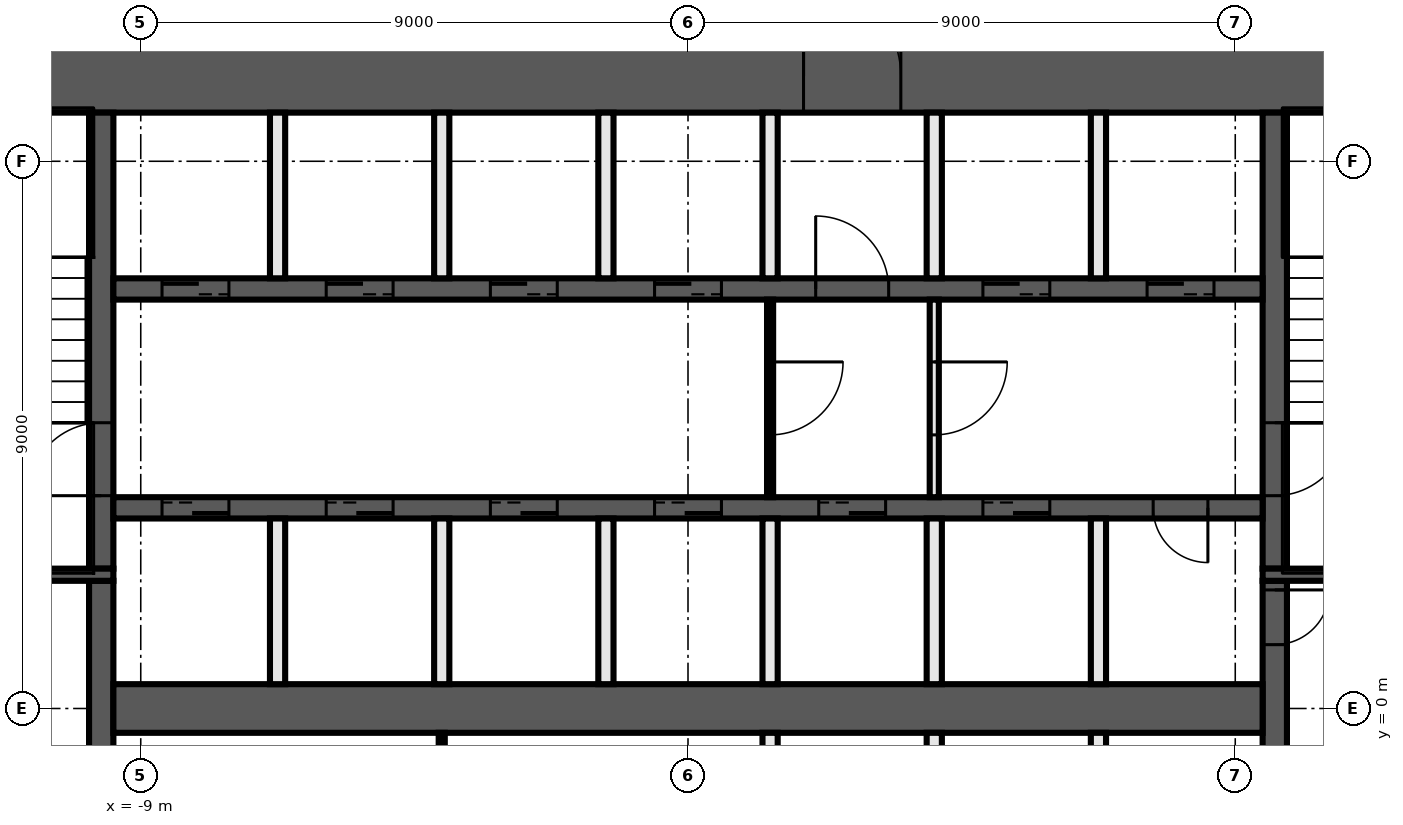
"""IFC4 building model, lengths in metres.
Left out: names, types, materials, properties, quantities, classifications, styles, units other than length and angle.
Written with IfcOpenShell. Run it as: python <this file> out.ifc"""

import sys

from ifc_helpers import new_model, si_unit, direction, frame, frame_2d, origin, place, context, subcontext, project, spatial, rectangle, extrude, element, fill, save


model = new_model("IFC4")
c1 = context("Model", 3, precision=1e-05, world=origin(), true_north=direction((0.0, 1.0)))
c2 = subcontext(c1, "Body", "Model", "MODEL_VIEW")
j1 = project(units=[si_unit("LENGTHUNIT", "METRE"), si_unit("PLANEANGLEUNIT", "RADIAN")], contexts=[c1])
p1 = place(None, origin())
s1 = spatial("IfcSite", under=j1, at=p1, CompositionType="ELEMENT")
p2 = place(p1, origin())
s2 = spatial("IfcBuilding", under=s1, at=p2, CompositionType="ELEMENT")
p3 = place(p2, frame((0.0, 0.0, -6.0)))
s3 = spatial("IfcBuildingStorey", under=s2, at=p3, CompositionType="ELEMENT", Elevation=-6.0)
p4 = place(p3, frame((-14.0, 10.4, 0.0), z_axis=(0.0, 0.0, 1.0), x_axis=(1.0, 0.0, 0.0)))
e1 = element("IfcWall", 1, at=p4, inside=s3, PredefinedType="SHEAR", context=c2, shape_type="SweptSolid", body=[
    extrude(rectangle(XDim=28.0, YDim=1.2, at=frame_2d((14.0, 0.0))), origin(), (0.0, 0.0, 1.0), 5.55),
])
p5 = place(p4, frame((15.9, 0.0, 0.0)))
e2 = element("IfcOpeningElement", 2, at=p5, cuts=e1, PredefinedType="OPENING", context=c2, shape_type="SweptSolid", body=[
    extrude(rectangle(XDim=1.6, YDim=2.1, at=frame_2d((0.8, 1.05))), frame((0.0, 0.61, 0.0), z_axis=(0.0, -1.0, 0.0), x_axis=(1.0, 0.0, 0.0)), (0.0, 0.0, 1.0), 1.22),
])
p6 = place(p3, frame((9.65, 2.1, 0.0), z_axis=(0.0, 0.0, 1.0), x_axis=(0.0, -1.0, 0.0)))
e3 = element("IfcWall", 3, at=p6, inside=s3, PredefinedType="SHEAR", context=c2, shape_type="SweptSolid", body=[
    extrude(rectangle(XDim=4.2, YDim=0.4, at=frame_2d((2.1, 0.0))), origin(), (0.0, 0.0, 1.0), 5.55),
])
p7 = place(p6, frame((0.15, 0.0, 0.0)))
e4 = element("IfcOpeningElement", 4, at=p7, cuts=e3, PredefinedType="OPENING", context=c2, shape_type="SweptSolid", body=[
    extrude(rectangle(XDim=0.9, YDim=2.1, at=frame_2d((0.45, 1.05))), frame((0.0, 0.21, 0.0), z_axis=(0.0, -1.0, 0.0), x_axis=(1.0, 0.0, 0.0)), (0.0, 0.0, 1.0), 0.42),
])
p8 = place(p3, frame((9.65, 9.8, 0.0), z_axis=(0.0, 0.0, 1.0), x_axis=(0.0, -1.0, 0.0)))
e5 = element("IfcWall", 5, at=p8, inside=s3, PredefinedType="SHEAR", context=c2, shape_type="SweptSolid", body=[
    extrude(rectangle(XDim=7.5, YDim=0.4, at=frame_2d((3.75, 0.0))), origin(), (0.0, 0.0, 1.0), 5.55),
])
p9 = place(p8, frame((5.1, 0.0, 0.0)))
e6 = element("IfcOpeningElement", 6, at=p9, cuts=e5, PredefinedType="OPENING", context=c2, shape_type="SweptSolid", body=[
    extrude(rectangle(XDim=1.2, YDim=2.1, at=frame_2d((0.6, 1.05))), frame((0.0, 0.21, 0.0), z_axis=(0.0, -1.0, 0.0), x_axis=(1.0, 0.0, 0.0)), (0.0, 0.0, 1.0), 0.42),
])
p10 = place(p3, frame((-9.65, -2.1, 0.0), z_axis=(0.0, 0.0, 1.0), x_axis=(0.0, 1.0, 0.0)))
e7 = element("IfcWall", 7, at=p10, inside=s3, PredefinedType="SHEAR", context=c2, shape_type="SweptSolid", body=[
    extrude(rectangle(XDim=4.2, YDim=0.4, at=frame_2d((2.1, 0.0))), origin(), (0.0, 0.0, 1.0), 5.55),
])
p11 = place(p3, frame((-9.65, 2.3, 0.0), z_axis=(0.0, 0.0, 1.0), x_axis=(0.0, 1.0, 0.0)))
e8 = element("IfcWall", 8, at=p11, inside=s3, PredefinedType="SHEAR", context=c2, shape_type="SweptSolid", body=[
    extrude(rectangle(XDim=7.5, YDim=0.4, at=frame_2d((3.75, 0.0))), origin(), (0.0, 0.0, 1.0), 5.55),
])
p12 = place(p11, frame((1.2, 0.0, 0.0)))
e9 = element("IfcOpeningElement", 9, at=p12, cuts=e8, PredefinedType="OPENING", context=c2, shape_type="SweptSolid", body=[
    extrude(rectangle(XDim=1.2, YDim=2.1, at=frame_2d((0.6, 1.05))), frame((0.0, 0.21, 0.0), z_axis=(0.0, -1.0, 0.0), x_axis=(1.0, 0.0, 0.0)), (0.0, 0.0, 1.0), 0.42),
])
for number, where, z_axis, x_axis in (
    (10, (9.45, 2.2, 0.0), (0.0, 0.0, 1.0), (1.0, 0.0, 0.0)),
    (11, (-9.45, 2.2, 0.0), (0.0, 0.0, 1.0), (-1.0, 0.0, 0.0)),
):
    element("IfcWall", number, at=place(p3, frame(where, z_axis=z_axis, x_axis=x_axis)), inside=s3, PredefinedType="SHEAR", context=c2, shape_type="SweptSolid", body=[
        extrude(rectangle(XDim=3.35, YDim=0.2, at=frame_2d((1.675, 0.0))), origin(), (0.0, 0.0, 1.0), 5.55),
    ])
p13 = place(p3, frame((-9.45, 6.9, 0.0), z_axis=(0.0, 0.0, 1.0), x_axis=(1.0, 0.0, 0.0)))
e12 = element("IfcWall", 12, at=p13, inside=s3, PredefinedType="SHEAR", context=c2, shape_type="SweptSolid", body=[
    extrude(rectangle(XDim=18.9, YDim=0.35, at=frame_2d((9.45, 0.0))), origin(), (0.0, 0.0, 1.0), 5.55),
])
p14 = place(p13, frame((0.8, 0.0, 0.0)))
e13 = element("IfcOpeningElement", 13, at=p14, cuts=e12, PredefinedType="OPENING", context=c2, shape_type="SweptSolid", body=[
    extrude(rectangle(XDim=1.1, YDim=2.1, at=frame_2d((0.55, 1.05))), frame((0.0, 0.185, 0.0), z_axis=(0.0, -1.0, 0.0), x_axis=(1.0, 0.0, 0.0)), (0.0, 0.0, 1.0), 0.37),
])
p15 = place(p13, frame((3.5, 0.0, 0.0)))
e14 = element("IfcOpeningElement", 14, at=p15, cuts=e12, PredefinedType="OPENING", context=c2, shape_type="SweptSolid", body=[
    extrude(rectangle(XDim=1.1, YDim=2.1, at=frame_2d((0.55, 1.05))), frame((0.0, 0.185, 0.0), z_axis=(0.0, -1.0, 0.0), x_axis=(1.0, 0.0, 0.0)), (0.0, 0.0, 1.0), 0.37),
])
p16 = place(p13, frame((6.2, 0.0, 0.0)))
e15 = element("IfcOpeningElement", 15, at=p16, cuts=e12, PredefinedType="OPENING", context=c2, shape_type="SweptSolid", body=[
    extrude(rectangle(XDim=1.1, YDim=2.1, at=frame_2d((0.55, 1.05))), frame((0.0, 0.185, 0.0), z_axis=(0.0, -1.0, 0.0), x_axis=(1.0, 0.0, 0.0)), (0.0, 0.0, 1.0), 0.37),
])
p17 = place(p13, frame((8.9, 0.0, 0.0)))
e16 = element("IfcOpeningElement", 16, at=p17, cuts=e12, PredefinedType="OPENING", context=c2, shape_type="SweptSolid", body=[
    extrude(rectangle(XDim=1.1, YDim=2.1, at=frame_2d((0.55, 1.05))), frame((0.0, 0.185, 0.0), z_axis=(0.0, -1.0, 0.0), x_axis=(1.0, 0.0, 0.0)), (0.0, 0.0, 1.0), 0.37),
])
p18 = place(p13, frame((11.55, 0.0, 0.0)))
e17 = element("IfcOpeningElement", 17, at=p18, cuts=e12, PredefinedType="OPENING", context=c2, shape_type="SweptSolid", body=[
    extrude(rectangle(XDim=1.2, YDim=2.1, at=frame_2d((0.6, 1.05))), frame((0.0, 0.185, 0.0), z_axis=(0.0, -1.0, 0.0), x_axis=(1.0, 0.0, 0.0)), (0.0, 0.0, 1.0), 0.37),
])
p19 = place(p13, frame((14.3, 0.0, 0.0)))
e18 = element("IfcOpeningElement", 18, at=p19, cuts=e12, PredefinedType="OPENING", context=c2, shape_type="SweptSolid", body=[
    extrude(rectangle(XDim=1.1, YDim=2.1, at=frame_2d((0.55, 1.05))), frame((0.0, 0.185, 0.0), z_axis=(0.0, -1.0, 0.0), x_axis=(1.0, 0.0, 0.0)), (0.0, 0.0, 1.0), 0.37),
])
p20 = place(p13, frame((17.0, 0.0, 0.0)))
e19 = element("IfcOpeningElement", 19, at=p20, cuts=e12, PredefinedType="OPENING", context=c2, shape_type="SweptSolid", body=[
    extrude(rectangle(XDim=1.1, YDim=2.1, at=frame_2d((0.55, 1.05))), frame((0.0, 0.185, 0.0), z_axis=(0.0, -1.0, 0.0), x_axis=(1.0, 0.0, 0.0)), (0.0, 0.0, 1.0), 0.37),
])
p21 = place(p3, frame((9.45, 3.3, 0.0), z_axis=(0.0, 0.0, 1.0), x_axis=(-1.0, 0.0, 0.0)))
e20 = element("IfcWall", 20, at=p21, inside=s3, PredefinedType="SHEAR", context=c2, shape_type="SweptSolid", body=[
    extrude(rectangle(XDim=18.9, YDim=0.35, at=frame_2d((9.45, 0.0))), origin(), (0.0, 0.0, 1.0), 5.55),
])
p22 = place(p21, frame((17.0, 0.0, 0.0)))
e21 = element("IfcOpeningElement", 21, at=p22, cuts=e20, PredefinedType="OPENING", context=c2, shape_type="SweptSolid", body=[
    extrude(rectangle(XDim=1.1, YDim=2.1, at=frame_2d((0.55, 1.05))), frame((0.0, 0.185, 0.0), z_axis=(0.0, -1.0, 0.0), x_axis=(1.0, 0.0, 0.0)), (0.0, 0.0, 1.0), 0.37),
])
p23 = place(p21, frame((14.3, 0.0, 0.0)))
e22 = element("IfcOpeningElement", 22, at=p23, cuts=e20, PredefinedType="OPENING", context=c2, shape_type="SweptSolid", body=[
    extrude(rectangle(XDim=1.1, YDim=2.1, at=frame_2d((0.55, 1.05))), frame((0.0, 0.185, 0.0), z_axis=(0.0, -1.0, 0.0), x_axis=(1.0, 0.0, 0.0)), (0.0, 0.0, 1.0), 0.37),
])
p24 = place(p21, frame((11.6, 0.0, 0.0)))
e23 = element("IfcOpeningElement", 23, at=p24, cuts=e20, PredefinedType="OPENING", context=c2, shape_type="SweptSolid", body=[
    extrude(rectangle(XDim=1.1, YDim=2.1, at=frame_2d((0.55, 1.05))), frame((0.0, 0.185, 0.0), z_axis=(0.0, -1.0, 0.0), x_axis=(1.0, 0.0, 0.0)), (0.0, 0.0, 1.0), 0.37),
])
p25 = place(p21, frame((8.9, 0.0, 0.0)))
e24 = element("IfcOpeningElement", 24, at=p25, cuts=e20, PredefinedType="OPENING", context=c2, shape_type="SweptSolid", body=[
    extrude(rectangle(XDim=1.1, YDim=2.1, at=frame_2d((0.55, 1.05))), frame((0.0, 0.185, 0.0), z_axis=(0.0, -1.0, 0.0), x_axis=(1.0, 0.0, 0.0)), (0.0, 0.0, 1.0), 0.37),
])
p26 = place(p21, frame((6.2, 0.0, 0.0)))
e25 = element("IfcOpeningElement", 25, at=p26, cuts=e20, PredefinedType="OPENING", context=c2, shape_type="SweptSolid", body=[
    extrude(rectangle(XDim=1.1, YDim=2.1, at=frame_2d((0.55, 1.05))), frame((0.0, 0.185, 0.0), z_axis=(0.0, -1.0, 0.0), x_axis=(1.0, 0.0, 0.0)), (0.0, 0.0, 1.0), 0.37),
])
p27 = place(p21, frame((3.5, 0.0, 0.0)))
e26 = element("IfcOpeningElement", 26, at=p27, cuts=e20, PredefinedType="OPENING", context=c2, shape_type="SweptSolid", body=[
    extrude(rectangle(XDim=1.1, YDim=2.1, at=frame_2d((0.55, 1.05))), frame((0.0, 0.185, 0.0), z_axis=(0.0, -1.0, 0.0), x_axis=(1.0, 0.0, 0.0)), (0.0, 0.0, 1.0), 0.37),
])
p28 = place(p21, frame((0.9, 0.0, 0.0)))
e27 = element("IfcOpeningElement", 27, at=p28, cuts=e20, PredefinedType="OPENING", context=c2, shape_type="SweptSolid", body=[
    extrude(rectangle(XDim=0.9, YDim=2.1, at=frame_2d((0.45, 1.05))), frame((0.0, 0.185, 0.0), z_axis=(0.0, -1.0, 0.0), x_axis=(1.0, 0.0, 0.0)), (0.0, 0.0, 1.0), 0.37),
])
p29 = place(p3, frame((-9.45, 0.0, 0.0), z_axis=(0.0, 0.0, 1.0), x_axis=(1.0, 0.0, 0.0)))
e28 = element("IfcWall", 28, at=p29, inside=s3, PredefinedType="SHEAR", context=c2, shape_type="SweptSolid", body=[
    extrude(rectangle(XDim=18.9, YDim=0.8, at=frame_2d((9.45, 0.0))), origin(), (0.0, 0.0, 1.0), 5.55),
])
for number, where, z_axis, x_axis in (
    (29, (6.75, -3.125, 0.0), (0.0, 0.0, 1.0), (0.0, 1.0, 0.0)),
    (30, (6.75, 0.4, 0.0), (0.0, 0.0, 1.0), (0.0, 1.0, 0.0)),
    (31, (6.75, 7.075, 0.0), (0.0, 0.0, 1.0), (0.0, 1.0, 0.0)),
):
    element("IfcWall", number, at=place(p3, frame(where, z_axis=z_axis, x_axis=x_axis)), inside=s3, PredefinedType="SOLIDWALL", context=c2, shape_type="SweptSolid", body=[
        extrude(rectangle(XDim=2.725, YDim=0.25, at=frame_2d((1.363, 0.0))), origin(), (0.0, 0.0, 1.0), 5.55),
    ])
p30 = place(p3, frame((4.05, 6.725, 0.0), z_axis=(0.0, 0.0, 1.0), x_axis=(0.0, -1.0, 0.0)))
e32 = element("IfcWall", 32, at=p30, inside=s3, PredefinedType="PARTITIONING", context=c2, shape_type="SweptSolid", body=[
    extrude(rectangle(XDim=3.25, YDim=0.15, at=frame_2d((1.625, 0.0))), origin(), (0.0, 0.0, 1.0), 5.55),
])
p31 = place(p30, frame((1.025, 0.0, 0.0)))
e33 = element("IfcOpeningElement", 33, at=p31, cuts=e32, PredefinedType="OPENING", context=c2, shape_type="SweptSolid", body=[
    extrude(rectangle(XDim=1.2, YDim=2.1, at=frame_2d((0.6, 1.05))), frame((0.0, 0.085, 0.0), z_axis=(0.0, -1.0, 0.0), x_axis=(1.0, 0.0, 0.0)), (0.0, 0.0, 1.0), 0.17),
])
for number, where, z_axis, x_axis in (
    (34, (4.05, -3.125, 0.0), (0.0, 0.0, 1.0), (0.0, 1.0, 0.0)),
    (35, (4.05, 0.4, 0.0), (0.0, 0.0, 1.0), (0.0, 1.0, 0.0)),
    (36, (4.05, 7.075, 0.0), (0.0, 0.0, 1.0), (0.0, 1.0, 0.0)),
):
    element("IfcWall", number, at=place(p3, frame(where, z_axis=z_axis, x_axis=x_axis)), inside=s3, PredefinedType="SOLIDWALL", context=c2, shape_type="SweptSolid", body=[
        extrude(rectangle(XDim=2.725, YDim=0.25, at=frame_2d((1.363, 0.0))), origin(), (0.0, 0.0, 1.0), 5.55),
    ])
p32 = place(p3, frame((1.35, 6.725, 0.0), z_axis=(0.0, 0.0, 1.0), x_axis=(0.0, -1.0, 0.0)))
e37 = element("IfcWall", 37, at=p32, inside=s3, PredefinedType="PARTITIONING", context=c2, shape_type="SweptSolid", body=[
    extrude(rectangle(XDim=3.25, YDim=0.1, at=frame_2d((1.625, 0.0))), origin(), (0.0, 0.0, 1.0), 5.55),
])
p33 = place(p32, frame((1.025, 0.0, 0.0)))
e38 = element("IfcOpeningElement", 38, at=p33, cuts=e37, PredefinedType="OPENING", context=c2, shape_type="SweptSolid", body=[
    extrude(rectangle(XDim=1.2, YDim=2.1, at=frame_2d((0.6, 1.05))), frame((0.0, 0.06, 0.0), z_axis=(0.0, -1.0, 0.0), x_axis=(1.0, 0.0, 0.0)), (0.0, 0.0, 1.0), 0.12),
])
for number, where, z_axis, x_axis in (
    (39, (1.35, -3.125, 0.0), (0.0, 0.0, 1.0), (0.0, 1.0, 0.0)),
    (40, (1.35, 0.4, 0.0), (0.0, 0.0, 1.0), (0.0, 1.0, 0.0)),
    (41, (1.35, 7.075, 0.0), (0.0, 0.0, 1.0), (0.0, 1.0, 0.0)),
    (42, (-1.35, 0.4, 0.0), (0.0, 0.0, 1.0), (0.0, 1.0, 0.0)),
    (43, (-1.35, 7.075, 0.0), (0.0, 0.0, 1.0), (0.0, 1.0, 0.0)),
):
    element("IfcWall", number, at=place(p3, frame(where, z_axis=z_axis, x_axis=x_axis)), inside=s3, PredefinedType="SOLIDWALL", context=c2, shape_type="SweptSolid", body=[
        extrude(rectangle(XDim=2.725, YDim=0.25, at=frame_2d((1.363, 0.0))), origin(), (0.0, 0.0, 1.0), 5.55),
    ])
p34 = place(p3, frame((-4.05, -3.125, 0.0), z_axis=(0.0, 0.0, 1.0), x_axis=(0.0, 1.0, 0.0)))
e44 = element("IfcWall", 44, at=p34, inside=s3, PredefinedType="PARTITIONING", context=c2, shape_type="SweptSolid", body=[
    extrude(rectangle(XDim=2.725, YDim=0.1, at=frame_2d((1.363, 0.0))), origin(), (0.0, 0.0, 1.0), 5.55),
])
for number, where, z_axis, x_axis in (
    (45, (-4.05, 0.4, 0.0), (0.0, 0.0, 1.0), (0.0, 1.0, 0.0)),
    (46, (-4.05, 7.075, 0.0), (0.0, 0.0, 1.0), (0.0, 1.0, 0.0)),
    (47, (-6.75, 0.4, 0.0), (0.0, 0.0, 1.0), (0.0, 1.0, 0.0)),
    (48, (-6.75, 7.075, 0.0), (0.0, 0.0, 1.0), (0.0, 1.0, 0.0)),
):
    element("IfcWall", number, at=place(p3, frame(where, z_axis=z_axis, x_axis=x_axis)), inside=s3, PredefinedType="SOLIDWALL", context=c2, shape_type="SweptSolid", body=[
        extrude(rectangle(XDim=2.725, YDim=0.25, at=frame_2d((1.363, 0.0))), origin(), (0.0, 0.0, 1.0), 5.55),
    ])
p35 = place(p7, origin())
e49 = element("IfcDoor", 49, at=p35, inside=s3, OperationType="SINGLE_SWING_RIGHT", PredefinedType="DOOR", context=c2, shape_type="SweptSolid", body=[
    extrude(rectangle(XDim=0.9, YDim=2.1, at=frame_2d((0.45, 1.05))), frame((0.0, 0.025, 0.0), z_axis=(0.0, -1.0, 0.0), x_axis=(1.0, 0.0, 0.0)), (0.0, 0.0, 1.0), 0.05),
])
fill(e4, e49)
p36 = place(p14, origin())
e50 = element("IfcDoor", 50, at=p36, inside=s3, OperationType="DOUBLE_DOOR_SLIDING", PredefinedType="DOOR", context=c2, shape_type="SweptSolid", body=[
    extrude(rectangle(XDim=1.1, YDim=2.1, at=frame_2d((0.55, 1.05))), frame((0.0, 0.025, 0.0), z_axis=(0.0, -1.0, 0.0), x_axis=(1.0, 0.0, 0.0)), (0.0, 0.0, 1.0), 0.05),
])
fill(e13, e50)
p37 = place(p15, origin())
e51 = element("IfcDoor", 51, at=p37, inside=s3, OperationType="DOUBLE_DOOR_SLIDING", PredefinedType="DOOR", context=c2, shape_type="SweptSolid", body=[
    extrude(rectangle(XDim=1.1, YDim=2.1, at=frame_2d((0.55, 1.05))), frame((0.0, 0.025, 0.0), z_axis=(0.0, -1.0, 0.0), x_axis=(1.0, 0.0, 0.0)), (0.0, 0.0, 1.0), 0.05),
])
fill(e14, e51)
p38 = place(p16, origin())
e52 = element("IfcDoor", 52, at=p38, inside=s3, OperationType="DOUBLE_DOOR_SLIDING", PredefinedType="DOOR", context=c2, shape_type="SweptSolid", body=[
    extrude(rectangle(XDim=1.1, YDim=2.1, at=frame_2d((0.55, 1.05))), frame((0.0, 0.025, 0.0), z_axis=(0.0, -1.0, 0.0), x_axis=(1.0, 0.0, 0.0)), (0.0, 0.0, 1.0), 0.05),
])
fill(e15, e52)
p39 = place(p17, origin())
e53 = element("IfcDoor", 53, at=p39, inside=s3, OperationType="DOUBLE_DOOR_SLIDING", PredefinedType="DOOR", context=c2, shape_type="SweptSolid", body=[
    extrude(rectangle(XDim=1.1, YDim=2.1, at=frame_2d((0.55, 1.05))), frame((0.0, 0.025, 0.0), z_axis=(0.0, -1.0, 0.0), x_axis=(1.0, 0.0, 0.0)), (0.0, 0.0, 1.0), 0.05),
])
fill(e16, e53)
p40 = place(p5, origin())
e54 = element("IfcDoor", 54, at=p40, inside=s3, OperationType="DOUBLE_DOOR_SINGLE_SWING", PredefinedType="DOOR", context=c2, shape_type="SweptSolid", body=[
    extrude(rectangle(XDim=1.6, YDim=2.1, at=frame_2d((0.8, 1.05))), frame((0.0, 0.025, 0.0), z_axis=(0.0, -1.0, 0.0), x_axis=(1.0, 0.0, 0.0)), (0.0, 0.0, 1.0), 0.05),
])
fill(e2, e54)
p41 = place(p18, origin())
e55 = element("IfcDoor", 55, at=p41, inside=s3, OperationType="SINGLE_SWING_LEFT", PredefinedType="DOOR", context=c2, shape_type="SweptSolid", body=[
    extrude(rectangle(XDim=1.2, YDim=2.1, at=frame_2d((0.6, 1.05))), frame((0.0, 0.025, 0.0), z_axis=(0.0, -1.0, 0.0), x_axis=(1.0, 0.0, 0.0)), (0.0, 0.0, 1.0), 0.05),
])
fill(e17, e55)
p42 = place(p19, origin())
e56 = element("IfcDoor", 56, at=p42, inside=s3, OperationType="DOUBLE_DOOR_SLIDING", PredefinedType="DOOR", context=c2, shape_type="SweptSolid", body=[
    extrude(rectangle(XDim=1.1, YDim=2.1, at=frame_2d((0.55, 1.05))), frame((0.0, 0.025, 0.0), z_axis=(0.0, -1.0, 0.0), x_axis=(1.0, 0.0, 0.0)), (0.0, 0.0, 1.0), 0.05),
])
fill(e18, e56)
p43 = place(p20, origin())
e57 = element("IfcDoor", 57, at=p43, inside=s3, OperationType="DOUBLE_DOOR_SLIDING", PredefinedType="DOOR", context=c2, shape_type="SweptSolid", body=[
    extrude(rectangle(XDim=1.1, YDim=2.1, at=frame_2d((0.55, 1.05))), frame((0.0, 0.025, 0.0), z_axis=(0.0, -1.0, 0.0), x_axis=(1.0, 0.0, 0.0)), (0.0, 0.0, 1.0), 0.05),
])
fill(e19, e57)
p44 = place(p22, origin())
e58 = element("IfcDoor", 58, at=p44, inside=s3, OperationType="DOUBLE_DOOR_SLIDING", PredefinedType="DOOR", context=c2, shape_type="SweptSolid", body=[
    extrude(rectangle(XDim=1.1, YDim=2.1, at=frame_2d((0.55, 1.05))), frame((0.0, 0.025, 0.0), z_axis=(0.0, -1.0, 0.0), x_axis=(1.0, 0.0, 0.0)), (0.0, 0.0, 1.0), 0.05),
])
fill(e21, e58)
p45 = place(p23, origin())
e59 = element("IfcDoor", 59, at=p45, inside=s3, OperationType="DOUBLE_DOOR_SLIDING", PredefinedType="DOOR", context=c2, shape_type="SweptSolid", body=[
    extrude(rectangle(XDim=1.1, YDim=2.1, at=frame_2d((0.55, 1.05))), frame((0.0, 0.025, 0.0), z_axis=(0.0, -1.0, 0.0), x_axis=(1.0, 0.0, 0.0)), (0.0, 0.0, 1.0), 0.05),
])
fill(e22, e59)
p46 = place(p24, origin())
e60 = element("IfcDoor", 60, at=p46, inside=s3, OperationType="DOUBLE_DOOR_SLIDING", PredefinedType="DOOR", context=c2, shape_type="SweptSolid", body=[
    extrude(rectangle(XDim=1.1, YDim=2.1, at=frame_2d((0.55, 1.05))), frame((0.0, 0.025, 0.0), z_axis=(0.0, -1.0, 0.0), x_axis=(1.0, 0.0, 0.0)), (0.0, 0.0, 1.0), 0.05),
])
fill(e23, e60)
p47 = place(p25, origin())
e61 = element("IfcDoor", 61, at=p47, inside=s3, OperationType="DOUBLE_DOOR_SLIDING", PredefinedType="DOOR", context=c2, shape_type="SweptSolid", body=[
    extrude(rectangle(XDim=1.1, YDim=2.1, at=frame_2d((0.55, 1.05))), frame((0.0, 0.025, 0.0), z_axis=(0.0, -1.0, 0.0), x_axis=(1.0, 0.0, 0.0)), (0.0, 0.0, 1.0), 0.05),
])
fill(e24, e61)
p48 = place(p26, origin())
e62 = element("IfcDoor", 62, at=p48, inside=s3, OperationType="DOUBLE_DOOR_SLIDING", PredefinedType="DOOR", context=c2, shape_type="SweptSolid", body=[
    extrude(rectangle(XDim=1.1, YDim=2.1, at=frame_2d((0.55, 1.05))), frame((0.0, 0.025, 0.0), z_axis=(0.0, -1.0, 0.0), x_axis=(1.0, 0.0, 0.0)), (0.0, 0.0, 1.0), 0.05),
])
fill(e25, e62)
p49 = place(p27, origin())
e63 = element("IfcDoor", 63, at=p49, inside=s3, OperationType="DOUBLE_DOOR_SLIDING", PredefinedType="DOOR", context=c2, shape_type="SweptSolid", body=[
    extrude(rectangle(XDim=1.1, YDim=2.1, at=frame_2d((0.55, 1.05))), frame((0.0, 0.025, 0.0), z_axis=(0.0, -1.0, 0.0), x_axis=(1.0, 0.0, 0.0)), (0.0, 0.0, 1.0), 0.05),
])
fill(e26, e63)
p50 = place(p28, origin())
e64 = element("IfcDoor", 64, at=p50, inside=s3, OperationType="SINGLE_SWING_LEFT", PredefinedType="DOOR", context=c2, shape_type="SweptSolid", body=[
    extrude(rectangle(XDim=0.9, YDim=2.1, at=frame_2d((0.45, 1.05))), frame((0.0, 0.025, 0.0), z_axis=(0.0, -1.0, 0.0), x_axis=(1.0, 0.0, 0.0)), (0.0, 0.0, 1.0), 0.05),
])
fill(e27, e64)
p51 = place(p9, origin())
e65 = element("IfcDoor", 65, at=p51, inside=s3, OperationType="SINGLE_SWING_LEFT", PredefinedType="DOOR", context=c2, shape_type="SweptSolid", body=[
    extrude(rectangle(XDim=1.2, YDim=2.1, at=frame_2d((0.6, 1.05))), frame((0.0, 0.025, 0.0), z_axis=(0.0, -1.0, 0.0), x_axis=(1.0, 0.0, 0.0)), (0.0, 0.0, 1.0), 0.05),
])
fill(e6, e65)
p52 = place(p12, origin())
e66 = element("IfcDoor", 66, at=p52, inside=s3, OperationType="SINGLE_SWING_RIGHT", PredefinedType="DOOR", context=c2, shape_type="SweptSolid", body=[
    extrude(rectangle(XDim=1.2, YDim=2.1, at=frame_2d((0.6, 1.05))), frame((0.0, 0.025, 0.0), z_axis=(0.0, -1.0, 0.0), x_axis=(1.0, 0.0, 0.0)), (0.0, 0.0, 1.0), 0.05),
])
fill(e9, e66)
p53 = place(p33, origin())
e67 = element("IfcDoor", 67, at=p53, inside=s3, OperationType="SINGLE_SWING_LEFT", PredefinedType="DOOR", context=c2, shape_type="SweptSolid", body=[
    extrude(rectangle(XDim=1.2, YDim=2.1, at=frame_2d((0.6, 1.05))), frame((0.0, 0.025, 0.0), z_axis=(0.0, -1.0, 0.0), x_axis=(1.0, 0.0, 0.0)), (0.0, 0.0, 1.0), 0.05),
])
fill(e38, e67)
p54 = place(p31, origin())
e68 = element("IfcDoor", 68, at=p54, inside=s3, OperationType="SINGLE_SWING_RIGHT", PredefinedType="DOOR", context=c2, shape_type="SweptSolid", body=[
    extrude(rectangle(XDim=1.2, YDim=2.1, at=frame_2d((0.6, 1.05))), frame((0.0, 0.025, 0.0), z_axis=(0.0, -1.0, 0.0), x_axis=(1.0, 0.0, 0.0)), (0.0, 0.0, 1.0), 0.05),
])
fill(e33, e68)
save(model, sys.argv[1])
